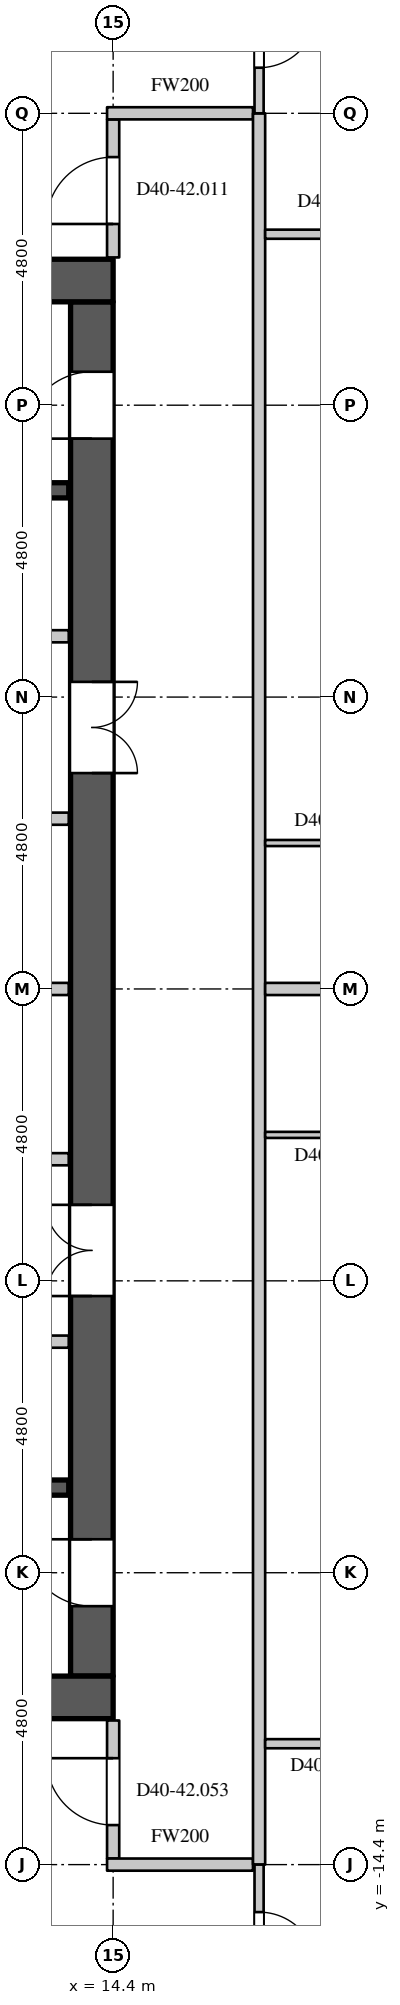
"""IFC4 building model, lengths in metres.
Left out: names, types, materials, properties, quantities, classifications, styles, units other than length and angle.
Written with IfcOpenShell. Run it as: python <this file> out.ifc"""

import sys

from ifc_helpers import new_model, si_unit, direction, frame, frame_2d, origin, place, context, subcontext, project, spatial, rectangle, extrude, element, fill, save


model = new_model("IFC4")
c1 = context("Model", 3, precision=1e-05, world=origin(), true_north=direction((0.0, 1.0)))
c2 = subcontext(c1, "Body", "Model", "MODEL_VIEW")
j1 = project(units=[si_unit("LENGTHUNIT", "METRE"), si_unit("PLANEANGLEUNIT", "RADIAN")], contexts=[c1])
p1 = place(None, origin())
s1 = spatial("IfcSite", under=j1, at=p1, CompositionType="ELEMENT")
p2 = place(p1, origin())
s2 = spatial("IfcBuilding", under=s1, at=p2, CompositionType="ELEMENT")
p3 = place(p2, frame((0.0, 0.0, 174.9)))
s3 = spatial("IfcBuildingStorey", under=s2, at=p3, CompositionType="ELEMENT", Elevation=174.9)
for number, where, z_axis, x_axis in (
    (1, (-14.4, 11.65, 0.0), (0.0, 0.0, 1.0), (1.0, 0.0, 0.0)),
    (2, (-14.4, -11.65, 0.0), (0.0, 0.0, 1.0), (1.0, 0.0, 0.0)),
):
    element("IfcWall", number, at=place(p3, frame(where, z_axis=z_axis, x_axis=x_axis)), inside=s3, PredefinedType="SHEAR", context=c2, shape_type="SweptSolid", body=[
        extrude(rectangle(XDim=28.8, YDim=0.7, at=frame_2d((14.4, 0.0))), origin(), (0.0, 0.0, 1.0), 4.2),
    ])
p4 = place(p3, frame((14.05, -11.3, 0.0), z_axis=(0.0, 0.0, 1.0), x_axis=(0.0, 1.0, 0.0)))
e3 = element("IfcWall", 3, at=p4, inside=s3, PredefinedType="SHEAR", context=c2, shape_type="SweptSolid", body=[
    extrude(rectangle(XDim=22.6, YDim=0.7, at=frame_2d((11.3, 0.0))), origin(), (0.0, 0.0, 1.0), 4.2),
])
p5 = place(p4, frame((20.35, 0.0, 0.0)))
e4 = element("IfcOpeningElement", 4, at=p5, cuts=e3, PredefinedType="OPENING", context=c2, shape_type="SweptSolid", body=[
    extrude(rectangle(XDim=1.1, YDim=2.2, at=frame_2d((0.55, 1.1))), frame((0.0, 0.36, 0.0), z_axis=(0.0, -1.0, 0.0), x_axis=(1.0, 0.0, 0.0)), (0.0, 0.0, 1.0), 0.72),
])
p6 = place(p4, frame((1.15, 0.0, 0.0)))
e5 = element("IfcOpeningElement", 5, at=p6, cuts=e3, PredefinedType="OPENING", context=c2, shape_type="SweptSolid", body=[
    extrude(rectangle(XDim=1.1, YDim=2.2, at=frame_2d((0.55, 1.1))), frame((0.0, 0.36, 0.0), z_axis=(0.0, -1.0, 0.0), x_axis=(1.0, 0.0, 0.0)), (0.0, 0.0, 1.0), 0.72),
])
p7 = place(p4, frame((14.85, 0.0, 0.0)))
e6 = element("IfcOpeningElement", 6, at=p7, cuts=e3, PredefinedType="OPENING", context=c2, shape_type="SweptSolid", body=[
    extrude(rectangle(XDim=1.5, YDim=2.4, at=frame_2d((0.75, 1.2))), frame((0.0, 0.36, 0.0), z_axis=(0.0, -1.0, 0.0), x_axis=(1.0, 0.0, 0.0)), (0.0, 0.0, 1.0), 0.72),
])
p8 = place(p4, frame((6.25, 0.0, 0.0)))
e7 = element("IfcOpeningElement", 7, at=p8, cuts=e3, PredefinedType="OPENING", context=c2, shape_type="SweptSolid", body=[
    extrude(rectangle(XDim=1.5, YDim=2.4, at=frame_2d((0.75, 1.2))), frame((0.0, 0.36, 0.0), z_axis=(0.0, -1.0, 0.0), x_axis=(1.0, 0.0, 0.0)), (0.0, 0.0, 1.0), 0.72),
])
p9 = place(p3, frame((14.4, -14.3, 0.0), z_axis=(0.0, 0.0, 1.0), x_axis=(0.0, 1.0, 0.0)))
e8 = element("IfcWall", 8, at=p9, inside=s3, PredefinedType="PARTITIONING", context=c2, shape_type="SweptSolid", body=[
    extrude(rectangle(XDim=2.27, YDim=0.2, at=frame_2d((1.135, 0.0))), origin(), (0.0, 0.0, 1.0), 3.95),
])
p10 = place(p9, frame((0.55, 0.0, 0.0)))
e9 = element("IfcOpeningElement", 9, at=p10, cuts=e8, PredefinedType="OPENING", context=c2, shape_type="SweptSolid", body=[
    extrude(rectangle(XDim=1.1, YDim=2.4, at=frame_2d((0.55, 1.2))), frame((0.0, 0.11, 0.0), z_axis=(0.0, -1.0, 0.0), x_axis=(1.0, 0.0, 0.0)), (0.0, 0.0, 1.0), 0.22),
])
p11 = place(p3, frame((14.3, -14.4, 0.0), z_axis=(0.0, 0.0, 1.0), x_axis=(1.0, 0.0, 0.0)))
e10 = element("IfcWall", 10, at=p11, inside=s3, PredefinedType="PARTITIONING", context=c2, shape_type="SweptSolid", body=[
    extrude(rectangle(XDim=2.4, YDim=0.2, at=frame_2d((1.2, 0.0))), origin(), (0.0, 0.0, 1.0), 3.95),
])
p12 = place(p3, frame((14.4, 12.03, 0.0), z_axis=(0.0, 0.0, 1.0), x_axis=(0.0, 1.0, 0.0)))
e11 = element("IfcWall", 11, at=p12, inside=s3, PredefinedType="PARTITIONING", context=c2, shape_type="SweptSolid", body=[
    extrude(rectangle(XDim=2.27, YDim=0.2, at=frame_2d((1.135, 0.0))), origin(), (0.0, 0.0, 1.0), 3.95),
])
p13 = place(p12, frame((0.55, 0.0, 0.0)))
e12 = element("IfcOpeningElement", 12, at=p13, cuts=e11, PredefinedType="OPENING", context=c2, shape_type="SweptSolid", body=[
    extrude(rectangle(XDim=1.1, YDim=2.4, at=frame_2d((0.55, 1.2))), frame((0.0, 0.11, 0.0), z_axis=(0.0, -1.0, 0.0), x_axis=(1.0, 0.0, 0.0)), (0.0, 0.0, 1.0), 0.22),
])
p14 = place(p3, frame((14.3, 14.4, 0.0), z_axis=(0.0, 0.0, 1.0), x_axis=(1.0, 0.0, 0.0)))
e13 = element("IfcWall", 13, at=p14, inside=s3, PredefinedType="PARTITIONING", context=c2, shape_type="SweptSolid", body=[
    extrude(rectangle(XDim=2.4, YDim=0.2, at=frame_2d((1.2, 0.0))), origin(), (0.0, 0.0, 1.0), 3.95),
])
p15 = place(p3, frame((16.8, -14.4, 0.0), z_axis=(0.0, 0.0, 1.0), x_axis=(0.0, 1.0, 0.0)))
e14 = element("IfcWall", 14, at=p15, inside=s3, PredefinedType="PARTITIONING", context=c2, shape_type="SweptSolid", body=[
    extrude(rectangle(XDim=28.8, YDim=0.2, at=frame_2d((14.4, 0.0))), origin(), (0.0, 0.0, 1.0), 3.95),
])
p16 = place(p3, frame((16.8, -18.131, 0.0), z_axis=(0.0, 0.0, 1.0), x_axis=(0.0, 1.0, 0.0)))
e15 = element("IfcWall", 15, at=p16, inside=s3, PredefinedType="PARTITIONING", context=c2, shape_type="SweptSolid", body=[
    extrude(rectangle(XDim=3.731, YDim=0.15, at=frame_2d((1.865, 0.0))), origin(), (0.0, 0.0, 1.0), 3.95),
])
p17 = place(p16, frame((2.0, 0.0, 0.0)))
e16 = element("IfcOpeningElement", 16, at=p17, cuts=e15, PredefinedType="OPENING", context=c2, shape_type="SweptSolid", body=[
    extrude(rectangle(XDim=0.95, YDim=2.2, at=frame_2d((0.475, 1.1))), frame((0.0, 0.085, 0.0), z_axis=(0.0, -1.0, 0.0), x_axis=(1.0, 0.0, 0.0)), (0.0, 0.0, 1.0), 0.17),
])
p18 = place(p3, frame((16.9, -12.412, 0.0), z_axis=(0.0, 0.0, 1.0), x_axis=(1.0, 0.0, 0.0)))
e17 = element("IfcWall", 17, at=p18, inside=s3, PredefinedType="PARTITIONING", context=c2, shape_type="SweptSolid", body=[
    extrude(rectangle(XDim=5.638, YDim=0.15, at=frame_2d((2.819, 0.0))), origin(), (0.0, 0.0, 1.0), 3.95),
])
p19 = place(p18, frame((1.35, 0.0, 0.0)))
e18 = element("IfcOpeningElement", 18, at=p19, cuts=e17, PredefinedType="OPENING", context=c2, shape_type="SweptSolid", body=[
    extrude(rectangle(XDim=0.95, YDim=2.2, at=frame_2d((0.475, 1.1))), frame((0.0, 0.085, 0.0), z_axis=(0.0, -1.0, 0.0), x_axis=(1.0, 0.0, 0.0)), (0.0, 0.0, 1.0), 0.17),
])
p20 = place(p3, frame((16.9, 12.412, 0.0), z_axis=(0.0, 0.0, 1.0), x_axis=(1.0, 0.0, 0.0)))
e19 = element("IfcWall", 19, at=p20, inside=s3, PredefinedType="PARTITIONING", context=c2, shape_type="SweptSolid", body=[
    extrude(rectangle(XDim=5.638, YDim=0.15, at=frame_2d((2.819, 0.0))), origin(), (0.0, 0.0, 1.0), 3.95),
])
p21 = place(p20, frame((1.35, 0.0, 0.0)))
e20 = element("IfcOpeningElement", 20, at=p21, cuts=e19, PredefinedType="OPENING", context=c2, shape_type="SweptSolid", body=[
    extrude(rectangle(XDim=0.95, YDim=2.2, at=frame_2d((0.475, 1.1))), frame((0.0, 0.085, 0.0), z_axis=(0.0, -1.0, 0.0), x_axis=(1.0, 0.0, 0.0)), (0.0, 0.0, 1.0), 0.17),
])
p22 = place(p3, frame((16.8, 14.4, 0.0), z_axis=(0.0, 0.0, 1.0), x_axis=(0.0, 1.0, 0.0)))
e21 = element("IfcWall", 21, at=p22, inside=s3, PredefinedType="PARTITIONING", context=c2, shape_type="SweptSolid", body=[
    extrude(rectangle(XDim=3.731, YDim=0.15, at=frame_2d((1.865, 0.0))), origin(), (0.0, 0.0, 1.0), 3.95),
])
p23 = place(p22, frame((0.75, 0.0, 0.0)))
e22 = element("IfcOpeningElement", 22, at=p23, cuts=e21, PredefinedType="OPENING", context=c2, shape_type="SweptSolid", body=[
    extrude(rectangle(XDim=0.95, YDim=2.2, at=frame_2d((0.475, 1.1))), frame((0.0, 0.085, 0.0), z_axis=(0.0, -1.0, 0.0), x_axis=(1.0, 0.0, 0.0)), (0.0, 0.0, 1.0), 0.17),
])
p24 = place(p3, frame((16.9, 0.0, 0.0), z_axis=(0.0, 0.0, 1.0), x_axis=(1.0, 0.0, 0.0)))
e23 = element("IfcWall", 23, at=p24, inside=s3, PredefinedType="PARTITIONING", context=c2, shape_type="SweptSolid", body=[
    extrude(rectangle(XDim=7.155, YDim=0.2, at=frame_2d((3.578, 0.0))), origin(), (0.0, 0.0, 1.0), 3.95),
])
p25 = place(p3, frame((3.82, 5.8, 0.0), z_axis=(0.0, 0.0, 1.0), x_axis=(1.0, 0.0, 0.0)))
e24 = element("IfcWall", 24, at=p25, inside=s3, PredefinedType="PARTITIONING", context=c2, shape_type="SweptSolid", body=[
    extrude(rectangle(XDim=9.85, YDim=0.2, at=frame_2d((4.925, 0.0))), origin(), (0.0, 0.0, 1.0), 3.95),
])
p26 = place(p25, frame((4.45, 0.0, 0.0)))
e25 = element("IfcOpeningElement", 25, at=p26, cuts=e24, PredefinedType="OPENING", context=c2, shape_type="SweptSolid", body=[
    extrude(rectangle(XDim=0.9, YDim=2.2, at=frame_2d((0.45, 1.1))), frame((0.0, 0.11, 0.0), z_axis=(0.0, -1.0, 0.0), x_axis=(1.0, 0.0, 0.0)), (0.0, 0.0, 1.0), 0.22),
])
p27 = place(p3, frame((7.82, -5.8, 0.0), z_axis=(0.0, 0.0, 1.0), x_axis=(1.0, 0.0, 0.0)))
e26 = element("IfcWall", 26, at=p27, inside=s3, PredefinedType="PARTITIONING", context=c2, shape_type="SweptSolid", body=[
    extrude(rectangle(XDim=5.85, YDim=0.2, at=frame_2d((2.925, 0.0))), origin(), (0.0, 0.0, 1.0), 3.95),
])
p28 = place(p27, frame((2.5, 0.0, 0.0)))
e27 = element("IfcOpeningElement", 27, at=p28, cuts=e26, PredefinedType="OPENING", context=c2, shape_type="SweptSolid", body=[
    extrude(rectangle(XDim=0.9, YDim=2.2, at=frame_2d((0.45, 1.1))), frame((0.0, 0.11, 0.0), z_axis=(0.0, -1.0, 0.0), x_axis=(1.0, 0.0, 0.0)), (0.0, 0.0, 1.0), 0.22),
])
p29 = place(p3, frame((7.8, -2.8, 0.0), z_axis=(0.0, 0.0, 1.0), x_axis=(1.0, 0.0, 0.0)))
e28 = element("IfcWall", 28, at=p29, inside=s3, PredefinedType="PARTITIONING", context=c2, shape_type="SweptSolid", body=[
    extrude(rectangle(XDim=5.87, YDim=0.2, at=frame_2d((2.935, 0.0))), origin(), (0.0, 0.0, 1.0), 3.95),
])
p30 = place(p29, frame((2.5, 0.0, 0.0)))
e29 = element("IfcOpeningElement", 29, at=p30, cuts=e28, PredefinedType="OPENING", context=c2, shape_type="SweptSolid", body=[
    extrude(rectangle(XDim=0.9, YDim=2.2, at=frame_2d((0.45, 1.1))), frame((0.0, 0.11, 0.0), z_axis=(0.0, -1.0, 0.0), x_axis=(1.0, 0.0, 0.0)), (0.0, 0.0, 1.0), 0.22),
])
p31 = place(p3, frame((7.8, 0.0, 0.0), z_axis=(0.0, 0.0, 1.0), x_axis=(1.0, 0.0, 0.0)))
e30 = element("IfcWall", 30, at=p31, inside=s3, PredefinedType="PARTITIONING", context=c2, shape_type="SweptSolid", body=[
    extrude(rectangle(XDim=5.87, YDim=0.2, at=frame_2d((2.935, 0.0))), origin(), (0.0, 0.0, 1.0), 3.95),
])
p32 = place(p3, frame((10.42, 2.8, 0.0), z_axis=(0.0, 0.0, 1.0), x_axis=(1.0, 0.0, 0.0)))
e31 = element("IfcWall", 31, at=p32, inside=s3, PredefinedType="PARTITIONING", context=c2, shape_type="SweptSolid", body=[
    extrude(rectangle(XDim=3.25, YDim=0.2, at=frame_2d((1.625, 0.0))), origin(), (0.0, 0.0, 1.0), 3.95),
])
p33 = place(p32, frame((1.3, 0.0, 0.0)))
e32 = element("IfcOpeningElement", 32, at=p33, cuts=e31, PredefinedType="OPENING", context=c2, shape_type="SweptSolid", body=[
    extrude(rectangle(XDim=0.6, YDim=2.0, at=frame_2d((0.3, 1.0))), frame((0.0, 0.11, 0.0), z_axis=(0.0, -1.0, 0.0), x_axis=(1.0, 0.0, 0.0)), (0.0, 0.0, 1.0), 0.22),
])
for number, where, z_axis, x_axis in (
    (33, (5.275, -8.2, 0.0), (0.0, 0.0, 1.0), (1.0, 0.0, 0.0)),
    (34, (5.275, 8.2, 0.0), (0.0, 0.0, 1.0), (1.0, 0.0, 0.0)),
):
    element("IfcWall", number, at=place(p3, frame(where, z_axis=z_axis, x_axis=x_axis)), inside=s3, PredefinedType="SHEAR", context=c2, shape_type="SweptSolid", body=[
        extrude(rectangle(XDim=8.395, YDim=0.25, at=frame_2d((4.198, 0.0))), origin(), (0.0, 0.0, 1.0), 3.95),
    ])
p34 = place(p3, frame((16.9, -2.4, 0.0), z_axis=(0.0, 0.0, 1.0), x_axis=(1.0, 0.0, 0.0)))
e35 = element("IfcWall", 35, at=p34, inside=s3, PredefinedType="PARTITIONING", context=c2, shape_type="SweptSolid", body=[
    extrude(rectangle(XDim=3.225, YDim=0.1, at=frame_2d((1.613, 0.0))), origin(), (0.0, 0.0, 1.0), 3.95),
])
p35 = place(p34, frame((1.15, 0.0, 0.0)))
e36 = element("IfcOpeningElement", 36, at=p35, cuts=e35, PredefinedType="OPENING", context=c2, shape_type="SweptSolid", body=[
    extrude(rectangle(XDim=0.9, YDim=2.2, at=frame_2d((0.45, 1.1))), frame((0.0, 0.06, 0.0), z_axis=(0.0, -1.0, 0.0), x_axis=(1.0, 0.0, 0.0)), (0.0, 0.0, 1.0), 0.12),
])
p36 = place(p3, frame((16.9, 2.4, 0.0), z_axis=(0.0, 0.0, 1.0), x_axis=(1.0, 0.0, 0.0)))
e37 = element("IfcWall", 37, at=p36, inside=s3, PredefinedType="PARTITIONING", context=c2, shape_type="SweptSolid", body=[
    extrude(rectangle(XDim=3.225, YDim=0.1, at=frame_2d((1.613, 0.0))), origin(), (0.0, 0.0, 1.0), 3.95),
])
p37 = place(p36, frame((1.15, 0.0, 0.0)))
e38 = element("IfcOpeningElement", 38, at=p37, cuts=e37, PredefinedType="OPENING", context=c2, shape_type="SweptSolid", body=[
    extrude(rectangle(XDim=0.9, YDim=2.2, at=frame_2d((0.45, 1.1))), frame((0.0, 0.06, 0.0), z_axis=(0.0, -1.0, 0.0), x_axis=(1.0, 0.0, 0.0)), (0.0, 0.0, 1.0), 0.12),
])
p38 = place(p5, origin())
e39 = element("IfcDoor", 39, at=p38, inside=s3, OperationType="SINGLE_SWING_LEFT", PredefinedType="DOOR", context=c2, shape_type="SweptSolid", body=[
    extrude(rectangle(XDim=1.1, YDim=2.2, at=frame_2d((0.55, 1.1))), frame((0.0, 0.345, 0.0), z_axis=(0.0, -1.0, 0.0), x_axis=(1.0, 0.0, 0.0)), (0.0, 0.0, 1.0), 0.05),
])
fill(e4, e39)
p39 = place(p6, origin())
e40 = element("IfcDoor", 40, at=p39, inside=s3, OperationType="SINGLE_SWING_RIGHT", PredefinedType="DOOR", context=c2, shape_type="SweptSolid", body=[
    extrude(rectangle(XDim=1.1, YDim=2.2, at=frame_2d((0.55, 1.1))), frame((0.0, 0.345, 0.0), z_axis=(0.0, -1.0, 0.0), x_axis=(1.0, 0.0, 0.0)), (0.0, 0.0, 1.0), 0.05),
])
fill(e5, e40)
p40 = place(p7, origin())
e41 = element("IfcDoor", 41, at=p40, inside=s3, OperationType="DOUBLE_DOOR_SINGLE_SWING", PredefinedType="DOOR", context=c2, shape_type="SweptSolid", body=[
    extrude(rectangle(XDim=1.5, YDim=2.4, at=frame_2d((0.75, 1.2))), frame((0.0, -0.295, 0.0), z_axis=(0.0, -1.0, 0.0), x_axis=(1.0, 0.0, 0.0)), (0.0, 0.0, 1.0), 0.05),
])
fill(e6, e41)
p41 = place(p8, origin())
e42 = element("IfcDoor", 42, at=p41, inside=s3, OperationType="DOUBLE_DOOR_SINGLE_SWING", PredefinedType="DOOR", context=c2, shape_type="SweptSolid", body=[
    extrude(rectangle(XDim=1.5, YDim=2.4, at=frame_2d((0.75, 1.2))), frame((0.0, 0.345, 0.0), z_axis=(0.0, -1.0, 0.0), x_axis=(1.0, 0.0, 0.0)), (0.0, 0.0, 1.0), 0.05),
])
fill(e7, e42)
p42 = place(p13, origin())
e43 = element("IfcDoor", 43, at=p42, inside=s3, OperationType="SINGLE_SWING_LEFT", PredefinedType="DOOR", context=c2, shape_type="SweptSolid", body=[
    extrude(rectangle(XDim=1.1, YDim=2.4, at=frame_2d((0.55, 1.2))), frame((0.0, 0.025, 0.0), z_axis=(0.0, -1.0, 0.0), x_axis=(1.0, 0.0, 0.0)), (0.0, 0.0, 1.0), 0.05),
])
fill(e12, e43)
p43 = place(p23, origin())
e44 = element("IfcDoor", 44, at=p43, inside=s3, OperationType="SINGLE_SWING_LEFT", PredefinedType="DOOR", context=c2, shape_type="SweptSolid", body=[
    extrude(rectangle(XDim=0.95, YDim=2.2, at=frame_2d((0.475, 1.1))), frame((0.0, 0.025, 0.0), z_axis=(0.0, -1.0, 0.0), x_axis=(1.0, 0.0, 0.0)), (0.0, 0.0, 1.0), 0.05),
])
fill(e22, e44)
p44 = place(p10, origin())
e45 = element("IfcDoor", 45, at=p44, inside=s3, OperationType="SINGLE_SWING_RIGHT", PredefinedType="DOOR", context=c2, shape_type="SweptSolid", body=[
    extrude(rectangle(XDim=1.1, YDim=2.4, at=frame_2d((0.55, 1.2))), frame((0.0, 0.025, 0.0), z_axis=(0.0, -1.0, 0.0), x_axis=(1.0, 0.0, 0.0)), (0.0, 0.0, 1.0), 0.05),
])
fill(e9, e45)
p45 = place(p17, origin())
e46 = element("IfcDoor", 46, at=p45, inside=s3, OperationType="SINGLE_SWING_RIGHT", PredefinedType="DOOR", context=c2, shape_type="SweptSolid", body=[
    extrude(rectangle(XDim=0.95, YDim=2.2, at=frame_2d((0.475, 1.1))), frame((0.0, 0.025, 0.0), z_axis=(0.0, -1.0, 0.0), x_axis=(1.0, 0.0, 0.0)), (0.0, 0.0, 1.0), 0.05),
])
fill(e16, e46)
save(model, sys.argv[1])
